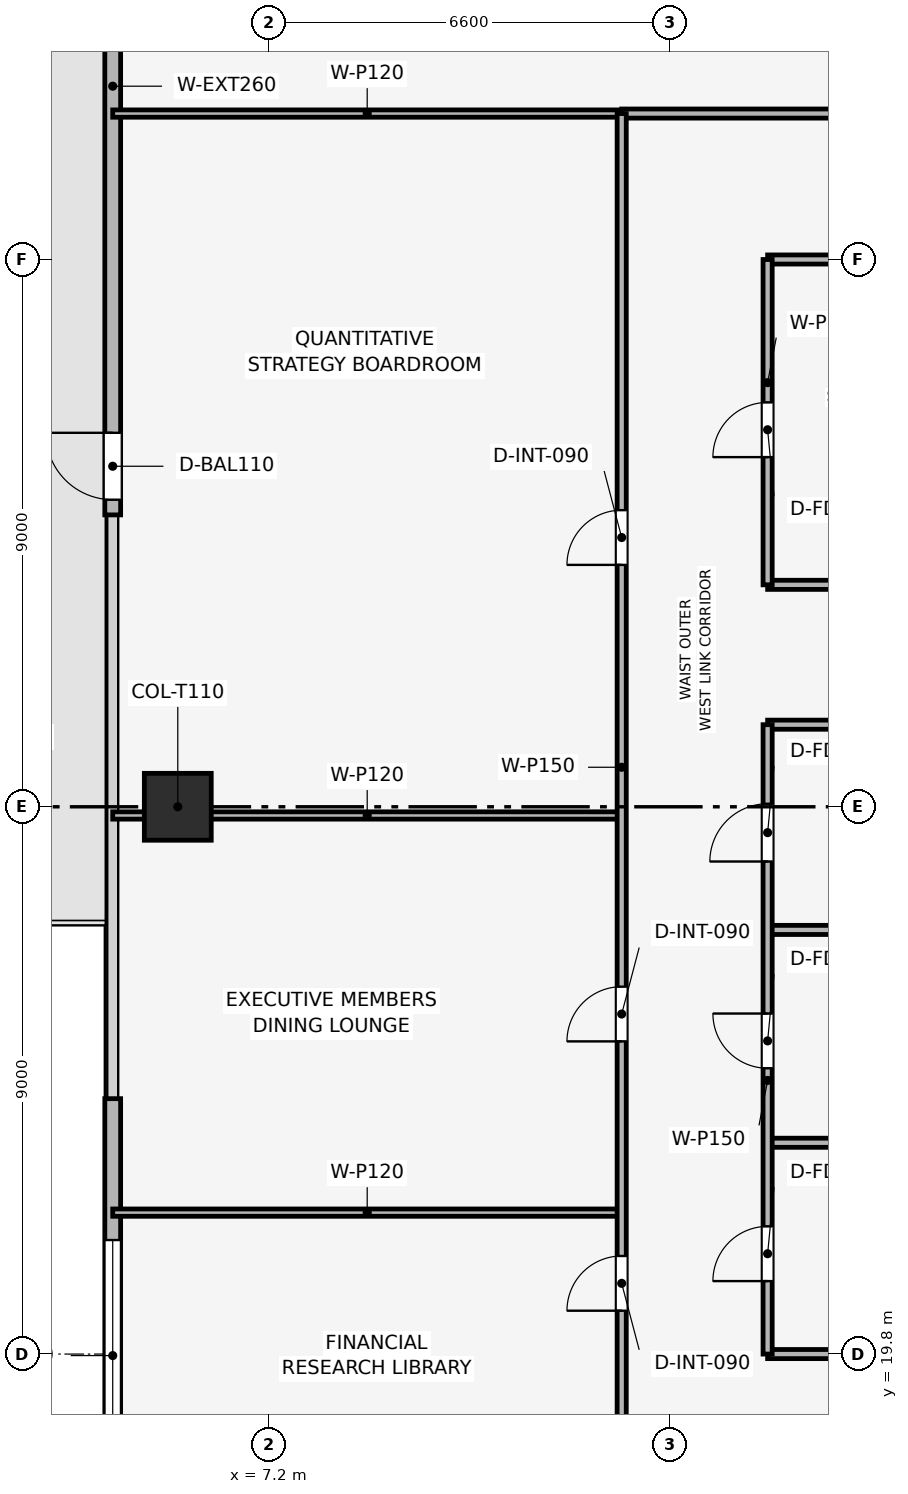
"""IFC4 building model, lengths in metres.
Left out: names, types, materials, properties, quantities, classifications, styles, units other than length and angle.
Written with IfcOpenShell. Run it as: python <this file> out.ifc"""

import sys

from ifc_helpers import new_model, si_unit, direction, frame, frame_2d, origin, origin_2d, place, context, subcontext, project, spatial, rectangle, extrude, element, fill, save


model = new_model("IFC4")
c1 = context("Model", 3, precision=1e-05, world=origin(), true_north=direction((0.0, 1.0)))
c2 = subcontext(c1, "Body", "Model", "MODEL_VIEW")
j1 = project(units=[si_unit("LENGTHUNIT", "METRE"), si_unit("PLANEANGLEUNIT", "RADIAN")], contexts=[c1])
p1 = place(None, origin())
s1 = spatial("IfcSite", under=j1, at=p1, CompositionType="ELEMENT")
p2 = place(p1, origin())
s2 = spatial("IfcBuilding", under=s1, at=p2, CompositionType="ELEMENT")
p3 = place(p2, frame((0.0, 0.0, 160.8)))
s3 = spatial("IfcBuildingStorey", under=s2, at=p3, CompositionType="ELEMENT", Elevation=160.8)
p4 = place(p3, frame((5.7, 28.8, 0.003), z_axis=(0.0, 0.0, 1.0), x_axis=(1.0, 0.0, 0.0)))
e1 = element("IfcColumn", 1, at=p4, inside=s3, PredefinedType="COLUMN", context=c2, shape_type="SweptSolid", body=[
    extrude(rectangle(XDim=1.1, YDim=1.1, at=origin_2d()), origin(), (0.0, 0.0, 1.0), 3.489),
])
p5 = place(p3, frame((4.63, 11.4, 0.0), z_axis=(0.0, 0.0, 1.0), x_axis=(0.0, 1.0, 0.0)))
e2 = element("IfcWall", 2, at=p5, inside=s3, PredefinedType="SOLIDWALL", context=c2, shape_type="SweptSolid", body=[
    extrude(rectangle(XDim=12.6, YDim=0.26, at=frame_2d((6.3, 0.0))), origin(), (0.0, 0.0, 1.0), 3.495),
])
p6 = place(p5, frame((6.475, 0.0, 0.9)))
e3 = element("IfcOpeningElement", 3, at=p6, cuts=e2, PredefinedType="OPENING", context=c2, shape_type="SweptSolid", body=[
    extrude(rectangle(XDim=3.8, YDim=1.9, at=frame_2d((1.9, 0.95))), frame((0.0, 0.14, 0.0), z_axis=(0.0, -1.0, 0.0), x_axis=(1.0, 0.0, 0.0)), (0.0, 0.0, 1.0), 0.28),
])
p7 = place(p3, frame((4.63, 33.6, 0.0), z_axis=(0.0, 0.0, 1.0), x_axis=(0.0, 1.0, 0.0)))
e4 = element("IfcWall", 4, at=p7, inside=s3, PredefinedType="SOLIDWALL", context=c2, shape_type="SweptSolid", body=[
    extrude(rectangle(XDim=12.6, YDim=0.26, at=frame_2d((6.3, 0.0))), origin(), (0.0, 0.0, 1.0), 3.495),
])
p8 = place(p7, frame((0.25, 0.0, 0.0)))
e5 = element("IfcOpeningElement", 5, at=p8, cuts=e4, PredefinedType="OPENING", context=c2, shape_type="SweptSolid", body=[
    extrude(rectangle(XDim=1.1, YDim=2.2, at=frame_2d((0.55, 1.1))), frame((0.0, 0.14, 0.0), z_axis=(0.0, -1.0, 0.0), x_axis=(1.0, 0.0, 0.0)), (0.0, 0.0, 1.0), 0.28),
])
p9 = place(p3, frame((15.4, 19.8, 0.0), z_axis=(0.0, 0.0, 1.0), x_axis=(1.0, 0.0, 0.0)))
e6 = element("IfcWall", 6, at=p9, inside=s3, PredefinedType="PARTITIONING", context=c2, shape_type="SweptSolid", body=[
    extrude(rectangle(XDim=4.4, YDim=0.15, at=frame_2d((2.2, 0.0))), origin(), (0.0, 0.0, 1.0), 3.03),
])
for number, where, z_axis, x_axis in (
    (7, (15.4, 23.275, 0.0), (0.0, 0.0, 1.0), (1.0, 0.0, 0.0)),
    (8, (15.4, 26.775, 0.0), (0.0, 0.0, 1.0), (1.0, 0.0, 0.0)),
    (9, (15.4, 30.15, 0.0), (0.0, 0.0, 1.0), (1.0, 0.0, 0.0)),
    (10, (15.4, 32.45, 0.0), (0.0, 0.0, 1.0), (1.0, 0.0, 0.0)),
):
    element("IfcWall", number, at=place(p3, frame(where, z_axis=z_axis, x_axis=x_axis)), inside=s3, PredefinedType="PARTITIONING", context=c2, shape_type="SweptSolid", body=[
        extrude(rectangle(XDim=4.4, YDim=0.15, at=frame_2d((2.2, 0.0))), origin(), (0.0, 0.0, 1.0), 3.495),
    ])
p10 = place(p3, frame((15.4, 37.8, 0.0), z_axis=(0.0, 0.0, 1.0), x_axis=(1.0, 0.0, 0.0)))
e11 = element("IfcWall", 11, at=p10, inside=s3, PredefinedType="PARTITIONING", context=c2, shape_type="SweptSolid", body=[
    extrude(rectangle(XDim=4.4, YDim=0.15, at=frame_2d((2.2, 0.0))), origin(), (0.0, 0.0, 1.0), 3.03),
])
p11 = place(p3, frame((15.4, 19.8, 0.0), z_axis=(0.0, 0.0, 1.0), x_axis=(0.0, 1.0, 0.0)))
e12 = element("IfcWall", 12, at=p11, inside=s3, PredefinedType="PARTITIONING", context=c2, shape_type="SweptSolid", body=[
    extrude(rectangle(XDim=10.35, YDim=0.15, at=frame_2d((5.175, 0.0))), origin(), (0.0, 0.0, 1.0), 3.03),
])
p12 = place(p11, frame((1.2, 0.0, 0.0)))
e13 = element("IfcOpeningElement", 13, at=p12, cuts=e12, PredefinedType="OPENING", context=c2, shape_type="SweptSolid", body=[
    extrude(rectangle(XDim=0.9, YDim=2.1, at=frame_2d((0.45, 1.05))), frame((0.0, 0.085, 0.0), z_axis=(0.0, -1.0, 0.0), x_axis=(1.0, 0.0, 0.0)), (0.0, 0.0, 1.0), 0.17),
])
p13 = place(p11, frame((4.7, 0.0, 0.0)))
e14 = element("IfcOpeningElement", 14, at=p13, cuts=e12, PredefinedType="OPENING", context=c2, shape_type="SweptSolid", body=[
    extrude(rectangle(XDim=0.9, YDim=2.1, at=frame_2d((0.45, 1.05))), frame((0.0, 0.085, 0.0), z_axis=(0.0, -1.0, 0.0), x_axis=(1.0, 0.0, 0.0)), (0.0, 0.0, 1.0), 0.17),
])
p14 = place(p11, frame((8.1, 0.0, 0.0)))
e15 = element("IfcOpeningElement", 15, at=p14, cuts=e12, PredefinedType="OPENING", context=c2, shape_type="SweptSolid", body=[
    extrude(rectangle(XDim=0.95, YDim=2.1, at=frame_2d((0.475, 1.05))), frame((0.0, 0.085, 0.0), z_axis=(0.0, -1.0, 0.0), x_axis=(1.0, 0.0, 0.0)), (0.0, 0.0, 1.0), 0.17),
])
p15 = place(p3, frame((15.4, 32.45, 0.0), z_axis=(0.0, 0.0, 1.0), x_axis=(0.0, 1.0, 0.0)))
e16 = element("IfcWall", 16, at=p15, inside=s3, PredefinedType="PARTITIONING", context=c2, shape_type="SweptSolid", body=[
    extrude(rectangle(XDim=5.35, YDim=0.15, at=frame_2d((2.675, 0.0))), origin(), (0.0, 0.0, 1.0), 3.03),
])
p16 = place(p15, frame((2.1, 0.0, 0.0)))
e17 = element("IfcOpeningElement", 17, at=p16, cuts=e16, PredefinedType="OPENING", context=c2, shape_type="SweptSolid", body=[
    extrude(rectangle(XDim=0.9, YDim=2.1, at=frame_2d((0.45, 1.05))), frame((0.0, 0.085, 0.0), z_axis=(0.0, -1.0, 0.0), x_axis=(1.0, 0.0, 0.0)), (0.0, 0.0, 1.0), 0.17),
])
for number, where, z_axis, x_axis in (
    (18, (4.63, 22.126, 0.0), (0.0, 0.0, 1.0), (1.0, 0.0, 0.0)),
    (19, (4.63, 28.657, 0.0), (0.0, 0.0, 1.0), (1.0, 0.0, 0.0)),
    (20, (4.63, 40.2, 0.0), (0.0, 0.0, 1.0), (1.0, 0.0, 0.0)),
):
    element("IfcWall", number, at=place(p3, frame(where, z_axis=z_axis, x_axis=x_axis)), inside=s3, PredefinedType="PARTITIONING", context=c2, shape_type="SweptSolid", body=[
        extrude(rectangle(XDim=8.37, YDim=0.12, at=frame_2d((4.185, 0.0))), origin(), (0.0, 0.0, 1.0), 2.98),
    ])
p17 = place(p3, frame((13.0, 40.2, 0.0), z_axis=(0.0, 0.0, 1.0), x_axis=(1.0, 0.0, 0.0)))
e21 = element("IfcWall", 21, at=p17, inside=s3, PredefinedType="PARTITIONING", context=c2, shape_type="SweptSolid", body=[
    extrude(rectangle(XDim=31.6, YDim=0.15, at=frame_2d((15.8, 0.0))), origin(), (0.0, 0.0, 1.0), 3.03),
])
p18 = place(p17, frame((15.35, 0.0, 0.0)))
e22 = element("IfcOpeningElement", 22, at=p18, cuts=e21, PredefinedType="OPENING", context=c2, shape_type="SweptSolid", body=[
    extrude(rectangle(XDim=0.9, YDim=2.1, at=frame_2d((0.45, 1.05))), frame((0.0, 0.085, 0.0), z_axis=(0.0, -1.0, 0.0), x_axis=(1.0, 0.0, 0.0)), (0.0, 0.0, 1.0), 0.17),
])
p19 = place(p3, frame((13.0, 17.4, 0.0), z_axis=(0.0, 0.0, 1.0), x_axis=(0.0, 1.0, 0.0)))
e23 = element("IfcWall", 23, at=p19, inside=s3, PredefinedType="PARTITIONING", context=c2, shape_type="SweptSolid", body=[
    extrude(rectangle(XDim=22.8, YDim=0.15, at=frame_2d((11.4, 0.0))), origin(), (0.0, 0.0, 1.0), 3.03),
])
p20 = place(p19, frame((3.113, 0.0, 0.0)))
e24 = element("IfcOpeningElement", 24, at=p20, cuts=e23, PredefinedType="OPENING", context=c2, shape_type="SweptSolid", body=[
    extrude(rectangle(XDim=0.9, YDim=2.1, at=frame_2d((0.45, 1.05))), frame((0.0, 0.085, 0.0), z_axis=(0.0, -1.0, 0.0), x_axis=(1.0, 0.0, 0.0)), (0.0, 0.0, 1.0), 0.17),
])
p21 = place(p19, frame((7.542, 0.0, 0.0)))
e25 = element("IfcOpeningElement", 25, at=p21, cuts=e23, PredefinedType="OPENING", context=c2, shape_type="SweptSolid", body=[
    extrude(rectangle(XDim=0.9, YDim=2.1, at=frame_2d((0.45, 1.05))), frame((0.0, 0.085, 0.0), z_axis=(0.0, -1.0, 0.0), x_axis=(1.0, 0.0, 0.0)), (0.0, 0.0, 1.0), 0.17),
])
p22 = place(p19, frame((15.378, 0.0, 0.0)))
e26 = element("IfcOpeningElement", 26, at=p22, cuts=e23, PredefinedType="OPENING", context=c2, shape_type="SweptSolid", body=[
    extrude(rectangle(XDim=0.9, YDim=2.1, at=frame_2d((0.45, 1.05))), frame((0.0, 0.085, 0.0), z_axis=(0.0, -1.0, 0.0), x_axis=(1.0, 0.0, 0.0)), (0.0, 0.0, 1.0), 0.17),
])
p23 = place(p8, origin())
e27 = element("IfcDoor", 27, at=p23, inside=s3, OperationType="SINGLE_SWING_RIGHT", PredefinedType="DOOR", context=c2, shape_type="SweptSolid", body=[
    extrude(rectangle(XDim=1.1, YDim=2.2, at=frame_2d((0.55, 1.1))), frame((0.0, 0.025, 0.0), z_axis=(0.0, -1.0, 0.0), x_axis=(1.0, 0.0, 0.0)), (0.0, 0.0, 1.0), 0.05),
])
fill(e5, e27)
p24 = place(p6, origin())
e28 = element("IfcWindow", 28, at=p24, inside=s3, PartitioningType="SINGLE_PANEL", PredefinedType="WINDOW", context=c2, shape_type="SweptSolid", body=[
    extrude(rectangle(XDim=3.8, YDim=1.9, at=frame_2d((1.9, 0.95))), frame((0.0, 0.03, 0.0), z_axis=(0.0, -1.0, 0.0), x_axis=(1.0, 0.0, 0.0)), (0.0, 0.0, 1.0), 0.06),
])
fill(e3, e28)
p25 = place(p12, origin())
e29 = element("IfcDoor", 29, at=p25, inside=s3, OperationType="SINGLE_SWING_LEFT", PredefinedType="DOOR", context=c2, shape_type="SweptSolid", body=[
    extrude(rectangle(XDim=0.9, YDim=2.1, at=frame_2d((0.45, 1.05))), frame((0.0, 0.025, 0.0), z_axis=(0.0, -1.0, 0.0), x_axis=(1.0, 0.0, 0.0)), (0.0, 0.0, 1.0), 0.05),
])
fill(e13, e29)
p26 = place(p13, origin())
e30 = element("IfcDoor", 30, at=p26, inside=s3, OperationType="SINGLE_SWING_RIGHT", PredefinedType="DOOR", context=c2, shape_type="SweptSolid", body=[
    extrude(rectangle(XDim=0.9, YDim=2.1, at=frame_2d((0.45, 1.05))), frame((0.0, 0.025, 0.0), z_axis=(0.0, -1.0, 0.0), x_axis=(1.0, 0.0, 0.0)), (0.0, 0.0, 1.0), 0.05),
])
fill(e14, e30)
p27 = place(p14, origin())
e31 = element("IfcDoor", 31, at=p27, inside=s3, OperationType="SINGLE_SWING_LEFT", PredefinedType="DOOR", context=c2, shape_type="SweptSolid", body=[
    extrude(rectangle(XDim=0.95, YDim=2.1, at=frame_2d((0.475, 1.05))), frame((0.0, 0.025, 0.0), z_axis=(0.0, -1.0, 0.0), x_axis=(1.0, 0.0, 0.0)), (0.0, 0.0, 1.0), 0.05),
])
fill(e15, e31)
p28 = place(p16, origin())
e32 = element("IfcDoor", 32, at=p28, inside=s3, OperationType="SINGLE_SWING_LEFT", PredefinedType="DOOR", context=c2, shape_type="SweptSolid", body=[
    extrude(rectangle(XDim=0.9, YDim=2.1, at=frame_2d((0.45, 1.05))), frame((0.0, 0.025, 0.0), z_axis=(0.0, -1.0, 0.0), x_axis=(1.0, 0.0, 0.0)), (0.0, 0.0, 1.0), 0.05),
])
fill(e17, e32)
p29 = place(p20, origin())
e33 = element("IfcDoor", 33, at=p29, inside=s3, OperationType="SINGLE_SWING_LEFT", PredefinedType="DOOR", context=c2, shape_type="SweptSolid", body=[
    extrude(rectangle(XDim=0.9, YDim=2.1, at=frame_2d((0.45, 1.05))), frame((0.0, 0.025, 0.0), z_axis=(0.0, -1.0, 0.0), x_axis=(1.0, 0.0, 0.0)), (0.0, 0.0, 1.0), 0.05),
])
fill(e24, e33)
p30 = place(p21, origin())
e34 = element("IfcDoor", 34, at=p30, inside=s3, OperationType="SINGLE_SWING_LEFT", PredefinedType="DOOR", context=c2, shape_type="SweptSolid", body=[
    extrude(rectangle(XDim=0.9, YDim=2.1, at=frame_2d((0.45, 1.05))), frame((0.0, 0.025, 0.0), z_axis=(0.0, -1.0, 0.0), x_axis=(1.0, 0.0, 0.0)), (0.0, 0.0, 1.0), 0.05),
])
fill(e25, e34)
p31 = place(p22, origin())
e35 = element("IfcDoor", 35, at=p31, inside=s3, OperationType="SINGLE_SWING_LEFT", PredefinedType="DOOR", context=c2, shape_type="SweptSolid", body=[
    extrude(rectangle(XDim=0.9, YDim=2.1, at=frame_2d((0.45, 1.05))), frame((0.0, 0.025, 0.0), z_axis=(0.0, -1.0, 0.0), x_axis=(1.0, 0.0, 0.0)), (0.0, 0.0, 1.0), 0.05),
])
fill(e26, e35)
save(model, sys.argv[1])
